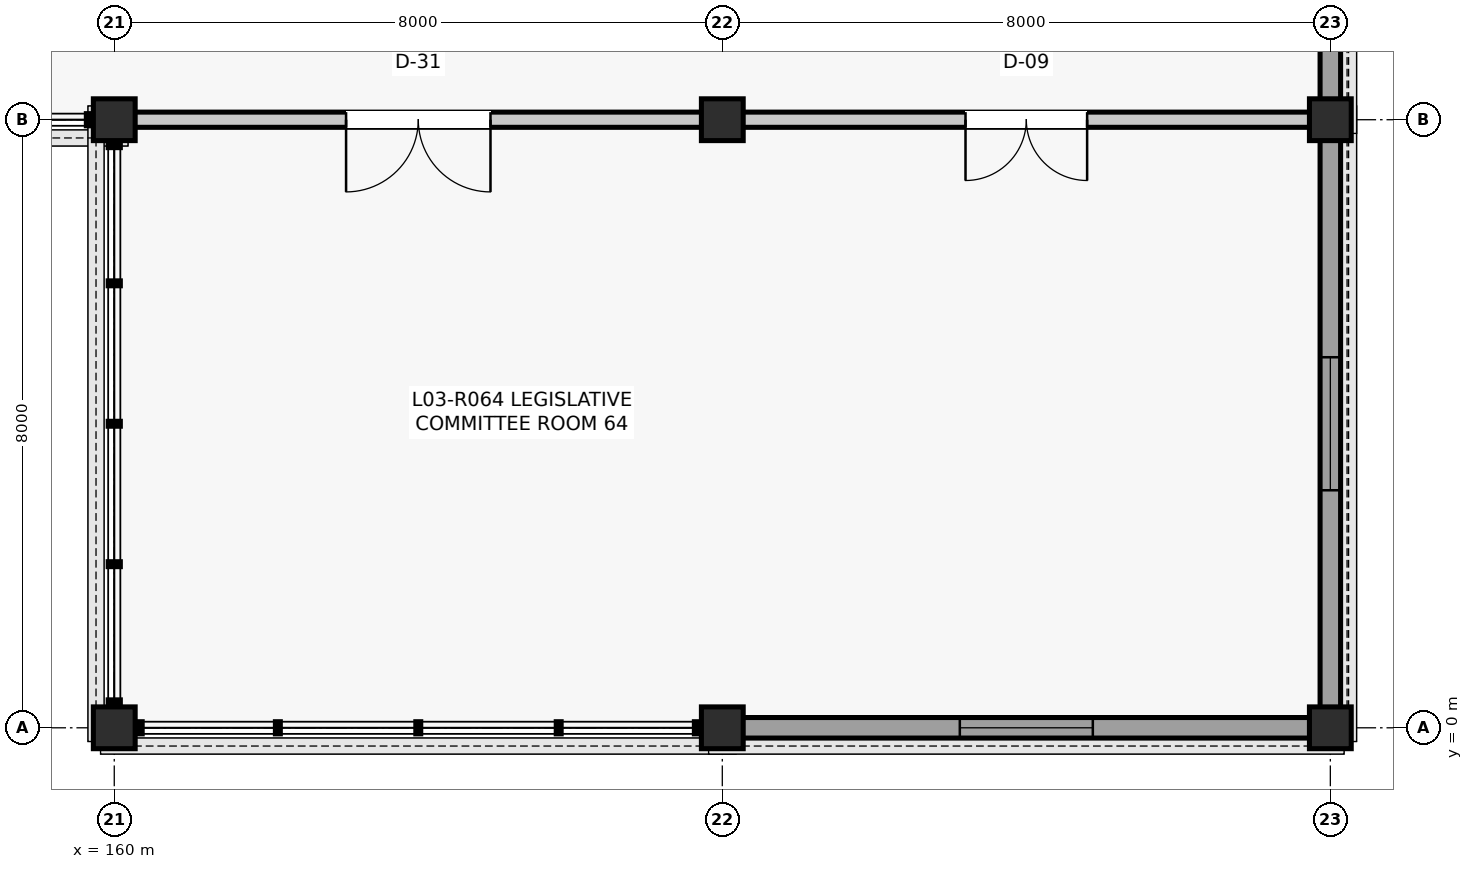
"""IFC4 building model, lengths in metres.
Left out: names, types, materials, properties, quantities, classifications, styles, units other than length and angle.
Written with IfcOpenShell. Run it as: python <this file> out.ifc"""

import sys

from ifc_helpers import new_model, si_unit, direction, frame, frame_2d, origin, origin_2d, place, context, subcontext, project, spatial, rectangle, extrude, element, fill, save


model = new_model("IFC4")
c1 = context("Model", 3, precision=1e-05, world=origin(), true_north=direction((0.0, 1.0)))
c2 = subcontext(c1, "Body", "Model", "MODEL_VIEW")
j1 = project(units=[si_unit("LENGTHUNIT", "METRE"), si_unit("PLANEANGLEUNIT", "RADIAN")], contexts=[c1])
p1 = place(None, origin())
s1 = spatial("IfcSite", under=j1, at=p1, CompositionType="ELEMENT")
p2 = place(p1, origin())
s2 = spatial("IfcBuilding", under=s1, at=p2, CompositionType="ELEMENT")
p3 = place(p2, frame((0.0, 0.0, 13.86)))
s3 = spatial("IfcBuildingStorey", under=s2, at=p3, CompositionType="ELEMENT", Elevation=13.86)
for number, where, z_axis, x_axis in (
    (1, (160.0, 0.0, 0.0), (0.0, 0.0, 1.0), (1.0, 0.0, 0.0)),
    (2, (160.0, 8.0, 0.0), (0.0, 0.0, 1.0), (1.0, 0.0, 0.0)),
    (3, (168.0, 0.0, 0.0), (0.0, 0.0, 1.0), (1.0, 0.0, 0.0)),
    (4, (168.0, 8.0, 0.0), (0.0, 0.0, 1.0), (1.0, 0.0, 0.0)),
    (5, (176.0, 0.0, 0.0), (0.0, 0.0, 1.0), (1.0, 0.0, 0.0)),
    (6, (176.0, 8.0, 0.0), (0.0, 0.0, 1.0), (1.0, 0.0, 0.0)),
):
    element("IfcColumn", number, at=place(p3, frame(where, z_axis=z_axis, x_axis=x_axis)), inside=s3, PredefinedType="COLUMN", context=c2, shape_type="SweptSolid", body=[
        extrude(rectangle(XDim=0.55, YDim=0.55, at=origin_2d()), origin(), (0.0, 0.0, 1.0), 3.96),
    ])
p4 = place(p3, frame((168.26, 0.0, 0.0), z_axis=(0.0, 0.0, 1.0), x_axis=(1.0, 0.0, 0.0)))
e7 = element("IfcWall", 7, at=p4, inside=s3, PredefinedType="SOLIDWALL", context=c2, shape_type="SweptSolid", body=[
    extrude(rectangle(XDim=7.48, YDim=0.27, at=frame_2d((3.74, 0.0))), origin(), (0.0, 0.0, 1.0), 3.295),
])
p5 = place(p4, frame((2.865, 0.0, 0.9)))
e8 = element("IfcOpeningElement", 8, at=p5, cuts=e7, PredefinedType="OPENING", context=c2, shape_type="SweptSolid", body=[
    extrude(rectangle(XDim=1.75, YDim=1.85, at=frame_2d((0.875, 0.925))), frame((0.0, 0.145, 0.0), z_axis=(0.0, -1.0, 0.0), x_axis=(1.0, 0.0, 0.0)), (0.0, 0.0, 1.0), 0.29),
])
p6 = place(p3, frame((176.0, 0.26, 0.0), z_axis=(0.0, 0.0, 1.0), x_axis=(0.0, 1.0, 0.0)))
e9 = element("IfcWall", 9, at=p6, inside=s3, PredefinedType="SOLIDWALL", context=c2, shape_type="SweptSolid", body=[
    extrude(rectangle(XDim=7.48, YDim=0.27, at=frame_2d((3.74, 0.0))), origin(), (0.0, 0.0, 1.0), 3.359),
])
p7 = place(p6, frame((2.865, 0.0, 0.9)))
e10 = element("IfcOpeningElement", 10, at=p7, cuts=e9, PredefinedType="OPENING", context=c2, shape_type="SweptSolid", body=[
    extrude(rectangle(XDim=1.75, YDim=1.85, at=frame_2d((0.875, 0.925))), frame((0.0, 0.145, 0.0), z_axis=(0.0, -1.0, 0.0), x_axis=(1.0, 0.0, 0.0)), (0.0, 0.0, 1.0), 0.29),
])
p8 = place(p3, frame((176.0, 8.26, 0.0), z_axis=(0.0, 0.0, 1.0), x_axis=(0.0, 1.0, 0.0)))
e11 = element("IfcWall", 11, at=p8, inside=s3, PredefinedType="SOLIDWALL", context=c2, shape_type="SweptSolid", body=[
    extrude(rectangle(XDim=7.405, YDim=0.27, at=frame_2d((3.703, 0.0))), origin(), (0.0, 0.0, 1.0), 3.299),
])
p9 = place(p8, frame((2.603, 0.0, 1.35)))
e12 = element("IfcOpeningElement", 12, at=p9, cuts=e11, PredefinedType="OPENING", context=c2, shape_type="SweptSolid", body=[
    extrude(rectangle(XDim=2.2, YDim=1.3, at=frame_2d((1.1, 0.65))), frame((0.0, 0.145, 0.0), z_axis=(0.0, -1.0, 0.0), x_axis=(1.0, 0.0, 0.0)), (0.0, 0.0, 1.0), 0.29),
])
p10 = place(p3, frame((160.265, 8.0, 0.0), z_axis=(0.0, 0.0, 1.0), x_axis=(1.0, 0.0, 0.0)))
e13 = element("IfcWall", 13, at=p10, inside=s3, PredefinedType="PARTITIONING", context=c2, shape_type="SweptSolid", body=[
    extrude(rectangle(XDim=7.47, YDim=0.2, at=frame_2d((3.735, 0.0))), origin(), (0.0, 0.0, 1.0), 3.248),
])
p11 = place(p10, frame((2.785, 0.0, 0.0)))
e14 = element("IfcOpeningElement", 14, at=p11, cuts=e13, PredefinedType="OPENING", context=c2, shape_type="SweptSolid", body=[
    extrude(rectangle(XDim=1.9, YDim=2.38, at=frame_2d((0.95, 1.19))), frame((0.0, 0.11, 0.0), z_axis=(0.0, -1.0, 0.0), x_axis=(1.0, 0.0, 0.0)), (0.0, 0.0, 1.0), 0.22),
])
p12 = place(p3, frame((168.265, 8.0, 0.0), z_axis=(0.0, 0.0, 1.0), x_axis=(1.0, 0.0, 0.0)))
e15 = element("IfcWall", 15, at=p12, inside=s3, PredefinedType="PARTITIONING", context=c2, shape_type="SweptSolid", body=[
    extrude(rectangle(XDim=7.47, YDim=0.2, at=frame_2d((3.735, 0.0))), origin(), (0.0, 0.0, 1.0), 3.236),
])
p13 = place(p12, frame((2.935, 0.0, 0.0)))
e16 = element("IfcOpeningElement", 16, at=p13, cuts=e15, PredefinedType="OPENING", context=c2, shape_type="SweptSolid", body=[
    extrude(rectangle(XDim=1.6, YDim=2.25, at=frame_2d((0.8, 1.125))), frame((0.0, 0.11, 0.0), z_axis=(0.0, -1.0, 0.0), x_axis=(1.0, 0.0, 0.0)), (0.0, 0.0, 1.0), 0.22),
])
p14 = place(p5, origin())
e17 = element("IfcWindow", 17, at=p14, inside=s3, PartitioningType="SINGLE_PANEL", PredefinedType="WINDOW", context=c2, shape_type="SweptSolid", body=[
    extrude(rectangle(XDim=1.75, YDim=1.85, at=frame_2d((0.875, 0.925))), frame((0.0, 0.03, 0.0), z_axis=(0.0, -1.0, 0.0), x_axis=(1.0, 0.0, 0.0)), (0.0, 0.0, 1.0), 0.06),
])
fill(e8, e17)
p15 = place(p7, origin())
e18 = element("IfcWindow", 18, at=p15, inside=s3, PartitioningType="SINGLE_PANEL", PredefinedType="WINDOW", context=c2, shape_type="SweptSolid", body=[
    extrude(rectangle(XDim=1.75, YDim=1.85, at=frame_2d((0.875, 0.925))), frame((0.0, 0.03, 0.0), z_axis=(0.0, -1.0, 0.0), x_axis=(1.0, 0.0, 0.0)), (0.0, 0.0, 1.0), 0.06),
])
fill(e10, e18)
p16 = place(p11, frame((1.9, 0.0, 0.0), z_axis=(0.0, 0.0, 1.0), x_axis=(-1.0, 0.0, 0.0)))
e19 = element("IfcDoor", 19, at=p16, inside=s3, OperationType="DOUBLE_DOOR_SINGLE_SWING", PredefinedType="DOOR", context=c2, shape_type="SweptSolid", body=[
    extrude(rectangle(XDim=1.9, YDim=2.38, at=frame_2d((0.95, 1.19))), frame((0.0, 0.025, 0.0), z_axis=(0.0, -1.0, 0.0), x_axis=(1.0, 0.0, 0.0)), (0.0, 0.0, 1.0), 0.05),
])
fill(e14, e19)
p17 = place(p13, frame((1.6, 0.0, 0.0), z_axis=(0.0, 0.0, 1.0), x_axis=(-1.0, 0.0, 0.0)))
e20 = element("IfcDoor", 20, at=p17, inside=s3, OperationType="DOUBLE_DOOR_SINGLE_SWING", PredefinedType="DOOR", context=c2, shape_type="SweptSolid", body=[
    extrude(rectangle(XDim=1.6, YDim=2.25, at=frame_2d((0.8, 1.125))), frame((0.0, 0.025, 0.0), z_axis=(0.0, -1.0, 0.0), x_axis=(1.0, 0.0, 0.0)), (0.0, 0.0, 1.0), 0.05),
])
fill(e16, e20)
save(model, sys.argv[1])
